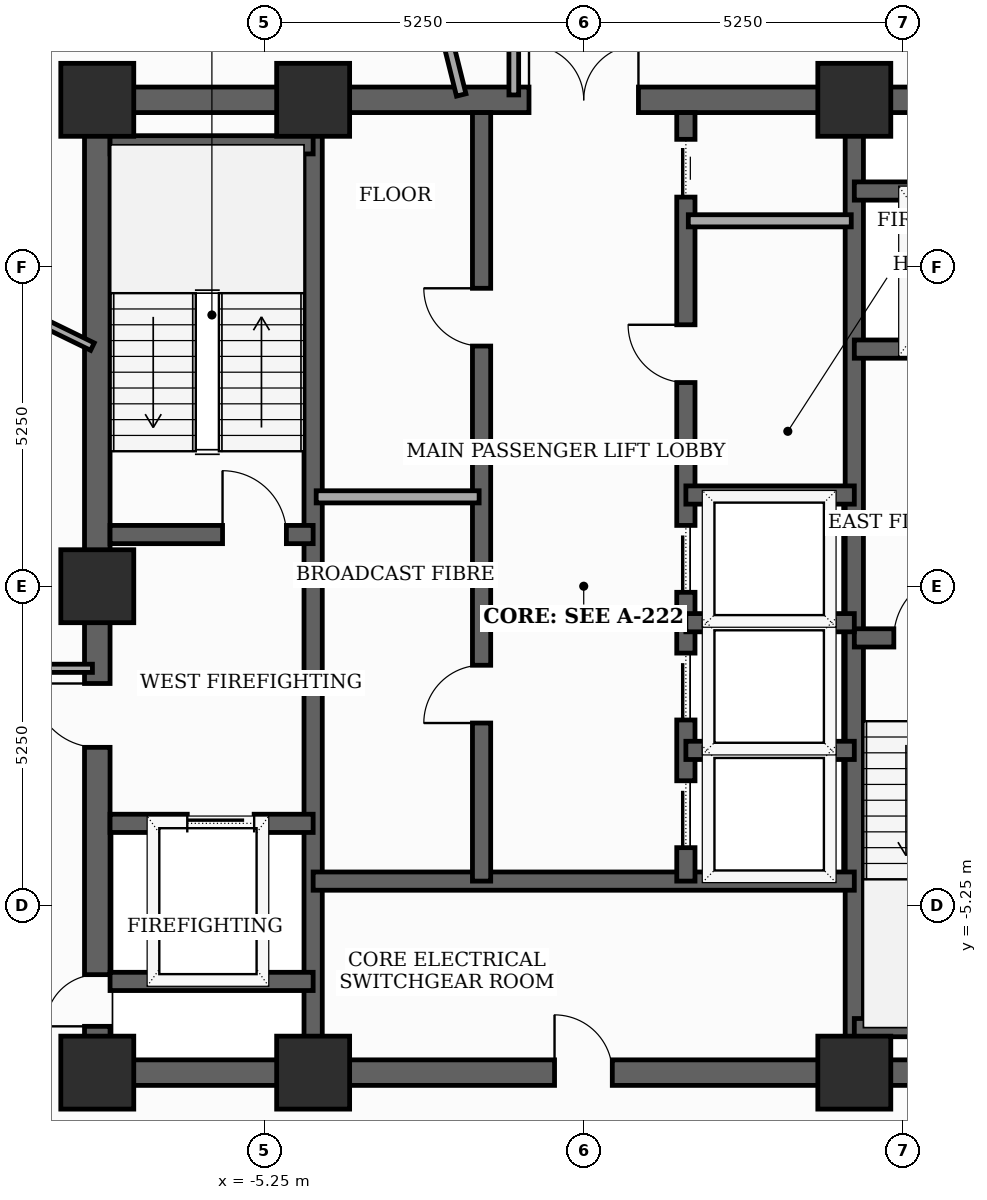
"""IFC4 building model, lengths in metres.
Left out: names, types, materials, properties, quantities, classifications, styles, units other than length and angle.
Written with IfcOpenShell. Run it as: python <this file> out.ifc"""

import sys

from ifc_helpers import new_model, si_unit, direction, frame, frame_2d, origin, origin_2d, place, context, subcontext, project, spatial, rectangle, extrude, element, fill, save


model = new_model("IFC4")
c1 = context("Model", 3, precision=1e-05, world=origin(), true_north=direction((0.0, 1.0)))
c2 = subcontext(c1, "Body", "Model", "MODEL_VIEW")
j1 = project(units=[si_unit("LENGTHUNIT", "METRE"), si_unit("PLANEANGLEUNIT", "RADIAN")], contexts=[c1])
p1 = place(None, origin())
s1 = spatial("IfcSite", under=j1, at=p1, CompositionType="ELEMENT")
p2 = place(p1, origin())
s2 = spatial("IfcBuilding", under=s1, at=p2, CompositionType="ELEMENT")
p3 = place(p2, frame((0.0, 0.0, 218.9)))
s3 = spatial("IfcBuildingStorey", under=s2, at=p3, CompositionType="ELEMENT", Elevation=218.9)
for number, where, z_axis, x_axis in (
    (1, (-8.0, -8.0, 0.0), (0.0, 0.0, 1.0), (1.0, 0.0, 0.0)),
    (2, (-4.45, -8.0, 0.0), (0.0, 0.0, 1.0), (1.0, 0.0, 0.0)),
    (3, (4.45, -8.0, 0.0), (0.0, 0.0, 1.0), (1.0, 0.0, 0.0)),
    (4, (4.45, 8.0, 0.0), (0.0, 0.0, 1.0), (1.0, 0.0, 0.0)),
    (5, (-4.45, 8.0, 0.0), (0.0, 0.0, 1.0), (1.0, 0.0, 0.0)),
    (6, (-8.0, 8.0, 0.0), (0.0, 0.0, 1.0), (1.0, 0.0, 0.0)),
    (7, (-8.0, 0.0, 0.0), (0.0, 0.0, 1.0), (1.0, 0.0, 0.0)),
):
    element("IfcColumn", number, at=place(p3, frame(where, z_axis=z_axis, x_axis=x_axis)), inside=s3, PredefinedType="COLUMN", context=c2, shape_type="SweptSolid", body=[
        extrude(rectangle(XDim=1.2, YDim=1.2, at=origin_2d()), origin(), (0.0, 0.0, 1.0), 3.7),
    ])
p4 = place(p3, frame((-8.0, -8.0, 0.0), z_axis=(0.0, 0.0, 1.0), x_axis=(0.0, 1.0, 0.0)))
e8 = element("IfcWall", 8, at=p4, inside=s3, PredefinedType="SHEAR", context=c2, shape_type="SweptSolid", body=[
    extrude(rectangle(XDim=16.0, YDim=0.42, at=frame_2d((8.0, 0.0))), origin(), (0.0, 0.0, 1.0), 3.5),
])
p5 = place(p4, frame((0.761, 0.0, 0.0)))
e9 = element("IfcOpeningElement", 9, at=p5, cuts=e8, PredefinedType="OPENING", context=c2, shape_type="SweptSolid", body=[
    extrude(rectangle(XDim=0.85, YDim=2.02, at=frame_2d((0.425, 1.01))), frame((0.0, 0.22, 0.0), z_axis=(0.0, -1.0, 0.0), x_axis=(1.0, 0.0, 0.0)), (0.0, 0.0, 1.0), 0.44),
])
p6 = place(p4, frame((5.35, 0.0, 0.0)))
e10 = element("IfcOpeningElement", 10, at=p6, cuts=e8, PredefinedType="OPENING", context=c2, shape_type="SweptSolid", body=[
    extrude(rectangle(XDim=1.05, YDim=2.15, at=frame_2d((0.525, 1.075))), frame((0.0, 0.22, 0.0), z_axis=(0.0, -1.0, 0.0), x_axis=(1.0, 0.0, 0.0)), (0.0, 0.0, 1.0), 0.44),
])
p7 = place(p3, frame((-8.0, -8.0, 0.0), z_axis=(0.0, 0.0, 1.0), x_axis=(1.0, 0.0, 0.0)))
e11 = element("IfcWall", 11, at=p7, inside=s3, PredefinedType="SHEAR", context=c2, shape_type="SweptSolid", body=[
    extrude(rectangle(XDim=16.0, YDim=0.42, at=frame_2d((8.0, 0.0))), origin(), (0.0, 0.0, 1.0), 3.5),
])
p8 = place(p7, frame((7.52, 0.0, 0.0)))
e12 = element("IfcOpeningElement", 12, at=p8, cuts=e11, PredefinedType="OPENING", context=c2, shape_type="SweptSolid", body=[
    extrude(rectangle(XDim=0.95, YDim=2.1, at=frame_2d((0.475, 1.05))), frame((0.0, 0.22, 0.0), z_axis=(0.0, -1.0, 0.0), x_axis=(1.0, 0.0, 0.0)), (0.0, 0.0, 1.0), 0.44),
])
p9 = place(p3, frame((-8.0, 8.0, 0.0), z_axis=(0.0, 0.0, 1.0), x_axis=(1.0, 0.0, 0.0)))
e13 = element("IfcWall", 13, at=p9, inside=s3, PredefinedType="SHEAR", context=c2, shape_type="SweptSolid", body=[
    extrude(rectangle(XDim=16.0, YDim=0.42, at=frame_2d((8.0, 0.0))), origin(), (0.0, 0.0, 1.0), 3.5),
])
p10 = place(p9, frame((7.1, 0.0, 0.0)))
e14 = element("IfcOpeningElement", 14, at=p10, cuts=e13, PredefinedType="OPENING", context=c2, shape_type="SweptSolid", body=[
    extrude(rectangle(XDim=1.8, YDim=2.15, at=frame_2d((0.9, 1.075))), frame((0.0, 0.22, 0.0), z_axis=(0.0, -1.0, 0.0), x_axis=(1.0, 0.0, 0.0)), (0.0, 0.0, 1.0), 0.44),
])
for number, where, z_axis, x_axis in (
    (15, (-4.45, -7.79, 0.0), (0.0, 0.0, 1.0), (0.0, 1.0, 0.0)),
    (16, (4.45, -7.79, 0.0), (0.0, 0.0, 1.0), (0.0, 1.0, 0.0)),
):
    element("IfcWall", number, at=place(p3, frame(where, z_axis=z_axis, x_axis=x_axis)), inside=s3, PredefinedType="SHEAR", context=c2, shape_type="SweptSolid", body=[
        extrude(rectangle(XDim=15.58, YDim=0.3, at=frame_2d((7.79, 0.0))), origin(), (0.0, 0.0, 1.0), 3.5),
    ])
p11 = place(p3, frame((-7.79, 0.85, 0.0), z_axis=(0.0, 0.0, 1.0), x_axis=(1.0, 0.0, 0.0)))
e17 = element("IfcWall", 17, at=p11, inside=s3, PredefinedType="SHEAR", context=c2, shape_type="SweptSolid", body=[
    extrude(rectangle(XDim=3.34, YDim=0.3, at=frame_2d((1.67, 0.0))), origin(), (0.0, 0.0, 1.0), 3.5),
])
p12 = place(p11, frame((1.85, 0.0, 0.0)))
e18 = element("IfcOpeningElement", 18, at=p12, cuts=e17, PredefinedType="OPENING", context=c2, shape_type="SweptSolid", body=[
    extrude(rectangle(XDim=1.05, YDim=2.15, at=frame_2d((0.525, 1.075))), frame((0.0, 0.16, 0.0), z_axis=(0.0, -1.0, 0.0), x_axis=(1.0, 0.0, 0.0)), (0.0, 0.0, 1.0), 0.32),
])
p13 = place(p3, frame((-7.79, 7.26, 0.0), z_axis=(0.0, 0.0, 1.0), x_axis=(1.0, 0.0, 0.0)))
e19 = element("IfcWall", 19, at=p13, inside=s3, PredefinedType="SHEAR", context=c2, shape_type="SweptSolid", body=[
    extrude(rectangle(XDim=3.34, YDim=0.3, at=frame_2d((1.67, 0.0))), origin(), (0.0, 0.0, 1.0), 3.5),
])
p14 = place(p3, frame((4.45, -0.85, 0.0), z_axis=(0.0, 0.0, 1.0), x_axis=(1.0, 0.0, 0.0)))
e20 = element("IfcWall", 20, at=p14, inside=s3, PredefinedType="SHEAR", context=c2, shape_type="SweptSolid", body=[
    extrude(rectangle(XDim=3.34, YDim=0.3, at=frame_2d((1.67, 0.0))), origin(), (0.0, 0.0, 1.0), 3.5),
])
p15 = place(p14, frame((0.65, 0.0, 0.0)))
e21 = element("IfcOpeningElement", 21, at=p15, cuts=e20, PredefinedType="OPENING", context=c2, shape_type="SweptSolid", body=[
    extrude(rectangle(XDim=1.05, YDim=2.15, at=frame_2d((0.525, 1.075))), frame((0.0, 0.16, 0.0), z_axis=(0.0, -1.0, 0.0), x_axis=(1.0, 0.0, 0.0)), (0.0, 0.0, 1.0), 0.32),
])
p16 = place(p3, frame((4.45, -7.26, 0.0), z_axis=(0.0, 0.0, 1.0), x_axis=(1.0, 0.0, 0.0)))
e22 = element("IfcWall", 22, at=p16, inside=s3, PredefinedType="SHEAR", context=c2, shape_type="SweptSolid", body=[
    extrude(rectangle(XDim=3.55, YDim=0.3, at=frame_2d((1.775, 0.0))), origin(), (0.0, 0.0, 1.0), 3.5),
])
p17 = place(p3, frame((-7.79, -3.9, 0.0), z_axis=(0.0, 0.0, 1.0), x_axis=(1.0, 0.0, 0.0)))
e23 = element("IfcWall", 23, at=p17, inside=s3, PredefinedType="SHEAR", context=c2, shape_type="SweptSolid", body=[
    extrude(rectangle(XDim=3.34, YDim=0.3, at=frame_2d((1.67, 0.0))), origin(), (0.0, 0.0, 1.0), 3.5),
])
p18 = place(p17, frame((1.27, 0.0, 0.0)))
e24 = element("IfcOpeningElement", 24, at=p18, cuts=e23, PredefinedType="OPENING", context=c2, shape_type="SweptSolid", body=[
    extrude(rectangle(XDim=1.1, YDim=2.1, at=frame_2d((0.55, 1.05))), frame((0.0, 0.16, 0.0), z_axis=(0.0, -1.0, 0.0), x_axis=(1.0, 0.0, 0.0)), (0.0, 0.0, 1.0), 0.32),
])
p19 = place(p3, frame((-7.79, -6.5, 0.0), z_axis=(0.0, 0.0, 1.0), x_axis=(1.0, 0.0, 0.0)))
e25 = element("IfcWall", 25, at=p19, inside=s3, PredefinedType="SHEAR", context=c2, shape_type="SweptSolid", body=[
    extrude(rectangle(XDim=3.34, YDim=0.3, at=frame_2d((1.67, 0.0))), origin(), (0.0, 0.0, 1.0), 3.5),
])
p20 = place(p3, frame((4.45, 3.9, 0.0), z_axis=(0.0, 0.0, 1.0), x_axis=(1.0, 0.0, 0.0)))
e26 = element("IfcWall", 26, at=p20, inside=s3, PredefinedType="SHEAR", context=c2, shape_type="SweptSolid", body=[
    extrude(rectangle(XDim=3.34, YDim=0.3, at=frame_2d((1.67, 0.0))), origin(), (0.0, 0.0, 1.0), 3.5),
])
p21 = place(p20, frame((1.18, 0.0, 0.0)))
e27 = element("IfcOpeningElement", 27, at=p21, cuts=e26, PredefinedType="OPENING", context=c2, shape_type="SweptSolid", body=[
    extrude(rectangle(XDim=1.1, YDim=2.1, at=frame_2d((0.55, 1.05))), frame((0.0, 0.16, 0.0), z_axis=(0.0, -1.0, 0.0), x_axis=(1.0, 0.0, 0.0)), (0.0, 0.0, 1.0), 0.32),
])
p22 = place(p3, frame((4.45, 6.5, 0.0), z_axis=(0.0, 0.0, 1.0), x_axis=(1.0, 0.0, 0.0)))
e28 = element("IfcWall", 28, at=p22, inside=s3, PredefinedType="SHEAR", context=c2, shape_type="SweptSolid", body=[
    extrude(rectangle(XDim=3.34, YDim=0.3, at=frame_2d((1.67, 0.0))), origin(), (0.0, 0.0, 1.0), 3.5),
])
p23 = place(p3, frame((-4.45, -4.85, 0.0), z_axis=(0.0, 0.0, 1.0), x_axis=(1.0, 0.0, 0.0)))
e29 = element("IfcWall", 29, at=p23, inside=s3, PredefinedType="SHEAR", context=c2, shape_type="SweptSolid", body=[
    extrude(rectangle(XDim=8.9, YDim=0.3, at=frame_2d((4.45, 0.0))), origin(), (0.0, 0.0, 1.0), 3.5),
])
p24 = place(p3, frame((-1.68, -4.85, 0.0), z_axis=(0.0, 0.0, 1.0), x_axis=(0.0, 1.0, 0.0)))
e30 = element("IfcWall", 30, at=p24, inside=s3, PredefinedType="SHEAR", context=c2, shape_type="SweptSolid", body=[
    extrude(rectangle(XDim=12.64, YDim=0.3, at=frame_2d((6.32, 0.0))), origin(), (0.0, 0.0, 1.0), 3.5),
])
p25 = place(p24, frame((2.6, 0.0, 0.0)))
e31 = element("IfcOpeningElement", 31, at=p25, cuts=e30, PredefinedType="OPENING", context=c2, shape_type="SweptSolid", body=[
    extrude(rectangle(XDim=0.95, YDim=2.1, at=frame_2d((0.475, 1.05))), frame((0.0, 0.16, 0.0), z_axis=(0.0, -1.0, 0.0), x_axis=(1.0, 0.0, 0.0)), (0.0, 0.0, 1.0), 0.32),
])
p26 = place(p24, frame((8.8, 0.0, 0.0)))
e32 = element("IfcOpeningElement", 32, at=p26, cuts=e30, PredefinedType="OPENING", context=c2, shape_type="SweptSolid", body=[
    extrude(rectangle(XDim=0.95, YDim=2.1, at=frame_2d((0.475, 1.05))), frame((0.0, 0.16, 0.0), z_axis=(0.0, -1.0, 0.0), x_axis=(1.0, 0.0, 0.0)), (0.0, 0.0, 1.0), 0.32),
])
p27 = place(p3, frame((1.68, -4.85, 0.0), z_axis=(0.0, 0.0, 1.0), x_axis=(0.0, 1.0, 0.0)))
e33 = element("IfcWall", 33, at=p27, inside=s3, PredefinedType="SHEAR", context=c2, shape_type="SweptSolid", body=[
    extrude(rectangle(XDim=12.64, YDim=0.3, at=frame_2d((6.32, 0.0))), origin(), (0.0, 0.0, 1.0), 3.5),
])
p28 = place(p27, frame((0.55, 0.0, 0.0)))
e34 = element("IfcOpeningElement", 34, at=p28, cuts=e33, PredefinedType="OPENING", context=c2, shape_type="SweptSolid", body=[
    extrude(rectangle(XDim=1.1, YDim=2.1, at=frame_2d((0.55, 1.05))), frame((0.0, 0.16, 0.0), z_axis=(0.0, -1.0, 0.0), x_axis=(1.0, 0.0, 0.0)), (0.0, 0.0, 1.0), 0.32),
])
p29 = place(p27, frame((2.65, 0.0, 0.0)))
e35 = element("IfcOpeningElement", 35, at=p29, cuts=e33, PredefinedType="OPENING", context=c2, shape_type="SweptSolid", body=[
    extrude(rectangle(XDim=1.1, YDim=2.1, at=frame_2d((0.55, 1.05))), frame((0.0, 0.16, 0.0), z_axis=(0.0, -1.0, 0.0), x_axis=(1.0, 0.0, 0.0)), (0.0, 0.0, 1.0), 0.32),
])
p30 = place(p27, frame((4.75, 0.0, 0.0)))
e36 = element("IfcOpeningElement", 36, at=p30, cuts=e33, PredefinedType="OPENING", context=c2, shape_type="SweptSolid", body=[
    extrude(rectangle(XDim=1.1, YDim=2.1, at=frame_2d((0.55, 1.05))), frame((0.0, 0.16, 0.0), z_axis=(0.0, -1.0, 0.0), x_axis=(1.0, 0.0, 0.0)), (0.0, 0.0, 1.0), 0.32),
])
p31 = place(p27, frame((8.2, 0.0, 0.0)))
e37 = element("IfcOpeningElement", 37, at=p31, cuts=e33, PredefinedType="OPENING", context=c2, shape_type="SweptSolid", body=[
    extrude(rectangle(XDim=0.95, YDim=2.1, at=frame_2d((0.475, 1.05))), frame((0.0, 0.16, 0.0), z_axis=(0.0, -1.0, 0.0), x_axis=(1.0, 0.0, 0.0)), (0.0, 0.0, 1.0), 0.32),
])
p32 = place(p27, frame((11.25, 0.0, 0.0)))
e38 = element("IfcOpeningElement", 38, at=p32, cuts=e33, PredefinedType="OPENING", context=c2, shape_type="SweptSolid", body=[
    extrude(rectangle(XDim=0.95, YDim=2.1, at=frame_2d((0.475, 1.05))), frame((0.0, 0.16, 0.0), z_axis=(0.0, -1.0, 0.0), x_axis=(1.0, 0.0, 0.0)), (0.0, 0.0, 1.0), 0.32),
])
for number, where, z_axis, x_axis in (
    (39, (1.68, 1.5, 0.0), (0.0, 0.0, 1.0), (1.0, 0.0, 0.0)),
    (40, (1.68, -2.7, 0.0), (0.0, 0.0, 1.0), (1.0, 0.0, 0.0)),
    (41, (1.68, -0.6, 0.0), (0.0, 0.0, 1.0), (1.0, 0.0, 0.0)),
):
    element("IfcWall", number, at=place(p3, frame(where, z_axis=z_axis, x_axis=x_axis)), inside=s3, PredefinedType="SHEAR", context=c2, shape_type="SweptSolid", body=[
        extrude(rectangle(XDim=2.77, YDim=0.3, at=frame_2d((1.385, 0.0))), origin(), (0.0, 0.0, 1.0), 3.5),
    ])
for number, where, z_axis, x_axis in (
    (42, (-4.4, 1.47, 0.0), (0.0, 0.0, 1.0), (1.0, 0.0, 0.0)),
    (43, (1.72, 6.01, 0.0), (0.0, 0.0, 1.0), (1.0, 0.0, 0.0)),
):
    element("IfcWall", number, at=place(p3, frame(where, z_axis=z_axis, x_axis=x_axis)), inside=s3, PredefinedType="SOLIDWALL", context=c2, shape_type="SweptSolid", body=[
        extrude(rectangle(XDim=2.68, YDim=0.2, at=frame_2d((1.34, 0.0))), origin(), (0.0, 0.0, 1.0), 3.5),
    ])
p33 = place(p3, frame((-8.08, -1.35, 0.0), z_axis=(0.0, 0.0, 1.0), x_axis=(-1.0, 0.0, 0.0)))
e44 = element("IfcWall", 44, at=p33, inside=s3, PredefinedType="PARTITIONING", context=c2, shape_type="SweptSolid", body=[
    extrude(rectangle(XDim=2.57, YDim=0.135, at=frame_2d((1.285, 0.0))), origin(), (0.0, 0.0, 1.0), 2.885),
])
p34 = place(p3, frame((-1.15, 10.65, 0.0), z_axis=(0.0, 0.0, 1.0), x_axis=(0.0, -1.0, 0.0)))
e45 = element("IfcWall", 45, at=p34, inside=s3, PredefinedType="PARTITIONING", context=c2, shape_type="SweptSolid", body=[
    extrude(rectangle(XDim=2.57, YDim=0.16, at=frame_2d((1.285, 0.0))), origin(), (0.0, 0.0, 1.0), 2.885),
])
p35 = place(p3, frame((-8.08, 3.941, 0.0), z_axis=(0.0, 0.0, 1.0), x_axis=(-0.898787530524, 0.438384505856, 0.0)))
e46 = element("IfcWall", 46, at=p35, inside=s3, PredefinedType="PARTITIONING", context=c2, shape_type="SweptSolid", body=[
    extrude(rectangle(XDim=16.843, YDim=0.135, at=frame_2d((8.421, 0.0))), origin(), (0.0, 0.0, 1.0), 2.885),
])
p36 = place(p35, frame((7.961, 0.0, 0.0)))
e47 = element("IfcOpeningElement", 47, at=p36, cuts=e46, PredefinedType="OPENING", context=c2, shape_type="SweptSolid", body=[
    extrude(rectangle(XDim=0.92, YDim=2.1, at=frame_2d((0.46, 1.05))), frame((0.0, 0.077, 0.0), z_axis=(0.0, -1.0, 0.0), x_axis=(1.0, 0.0, 0.0)), (0.0, 0.0, 1.0), 0.155),
])
p37 = place(p3, frame((-3.803, 15.255, 0.0), z_axis=(0.0, 0.0, 1.0), x_axis=(0.241851911951, -0.970313172479, 0.0)))
e48 = element("IfcWall", 48, at=p37, inside=s3, PredefinedType="PARTITIONING", context=c2, shape_type="SweptSolid", body=[
    extrude(rectangle(XDim=7.394, YDim=0.16, at=frame_2d((3.697, 0.0))), origin(), (0.0, 0.0, 1.0), 2.885),
])
p38 = place(p5, origin())
e49 = element("IfcDoor", 49, at=p38, inside=s3, OperationType="SINGLE_SWING_LEFT", PredefinedType="TRAPDOOR", context=c2, shape_type="SweptSolid", body=[
    extrude(rectangle(XDim=0.85, YDim=2.02, at=frame_2d((0.425, 1.01))), frame((0.0, 0.025, 0.0), z_axis=(0.0, -1.0, 0.0), x_axis=(1.0, 0.0, 0.0)), (0.0, 0.0, 1.0), 0.05),
])
fill(e9, e49)
p39 = place(p6, origin())
e50 = element("IfcDoor", 50, at=p39, inside=s3, OperationType="SINGLE_SWING_RIGHT", PredefinedType="DOOR", context=c2, shape_type="SweptSolid", body=[
    extrude(rectangle(XDim=1.05, YDim=2.15, at=frame_2d((0.525, 1.075))), frame((0.0, 0.025, 0.0), z_axis=(0.0, -1.0, 0.0), x_axis=(1.0, 0.0, 0.0)), (0.0, 0.0, 1.0), 0.05),
])
fill(e10, e50)
p40 = place(p8, origin())
e51 = element("IfcDoor", 51, at=p40, inside=s3, OperationType="SINGLE_SWING_LEFT", PredefinedType="DOOR", context=c2, shape_type="SweptSolid", body=[
    extrude(rectangle(XDim=0.95, YDim=2.1, at=frame_2d((0.475, 1.05))), frame((0.0, 0.025, 0.0), z_axis=(0.0, -1.0, 0.0), x_axis=(1.0, 0.0, 0.0)), (0.0, 0.0, 1.0), 0.05),
])
fill(e12, e51)
p41 = place(p10, origin())
e52 = element("IfcDoor", 52, at=p41, inside=s3, OperationType="DOUBLE_DOOR_SINGLE_SWING", PredefinedType="DOOR", context=c2, shape_type="SweptSolid", body=[
    extrude(rectangle(XDim=1.8, YDim=2.15, at=frame_2d((0.9, 1.075))), frame((0.0, 0.025, 0.0), z_axis=(0.0, -1.0, 0.0), x_axis=(1.0, 0.0, 0.0)), (0.0, 0.0, 1.0), 0.05),
])
fill(e14, e52)
p42 = place(p12, origin())
e53 = element("IfcDoor", 53, at=p42, inside=s3, OperationType="SINGLE_SWING_LEFT", PredefinedType="DOOR", context=c2, shape_type="SweptSolid", body=[
    extrude(rectangle(XDim=1.05, YDim=2.15, at=frame_2d((0.525, 1.075))), frame((0.0, 0.025, 0.0), z_axis=(0.0, -1.0, 0.0), x_axis=(1.0, 0.0, 0.0)), (0.0, 0.0, 1.0), 0.05),
])
fill(e18, e53)
p43 = place(p15, origin())
e54 = element("IfcDoor", 54, at=p43, inside=s3, OperationType="SINGLE_SWING_RIGHT", PredefinedType="DOOR", context=c2, shape_type="SweptSolid", body=[
    extrude(rectangle(XDim=1.05, YDim=2.15, at=frame_2d((0.525, 1.075))), frame((0.0, 0.025, 0.0), z_axis=(0.0, -1.0, 0.0), x_axis=(1.0, 0.0, 0.0)), (0.0, 0.0, 1.0), 0.05),
])
fill(e21, e54)
p44 = place(p18, origin())
e55 = element("IfcDoor", 55, at=p44, inside=s3, OperationType="SLIDING_TO_LEFT", PredefinedType="DOOR", context=c2, shape_type="SweptSolid", body=[
    extrude(rectangle(XDim=1.1, YDim=2.1, at=frame_2d((0.55, 1.05))), frame((0.0, 0.025, 0.0), z_axis=(0.0, -1.0, 0.0), x_axis=(1.0, 0.0, 0.0)), (0.0, 0.0, 1.0), 0.05),
])
fill(e24, e55)
p45 = place(p25, origin())
e56 = element("IfcDoor", 56, at=p45, inside=s3, OperationType="SINGLE_SWING_LEFT", PredefinedType="DOOR", context=c2, shape_type="SweptSolid", body=[
    extrude(rectangle(XDim=0.95, YDim=2.1, at=frame_2d((0.475, 1.05))), frame((0.0, 0.025, 0.0), z_axis=(0.0, -1.0, 0.0), x_axis=(1.0, 0.0, 0.0)), (0.0, 0.0, 1.0), 0.05),
])
fill(e31, e56)
p46 = place(p26, origin())
e57 = element("IfcDoor", 57, at=p46, inside=s3, OperationType="SINGLE_SWING_RIGHT", PredefinedType="DOOR", context=c2, shape_type="SweptSolid", body=[
    extrude(rectangle(XDim=0.95, YDim=2.1, at=frame_2d((0.475, 1.05))), frame((0.0, 0.025, 0.0), z_axis=(0.0, -1.0, 0.0), x_axis=(1.0, 0.0, 0.0)), (0.0, 0.0, 1.0), 0.05),
])
fill(e32, e57)
p47 = place(p28, origin())
e58 = element("IfcDoor", 58, at=p47, inside=s3, OperationType="SLIDING_TO_LEFT", PredefinedType="DOOR", context=c2, shape_type="SweptSolid", body=[
    extrude(rectangle(XDim=1.1, YDim=2.1, at=frame_2d((0.55, 1.05))), frame((0.0, 0.025, 0.0), z_axis=(0.0, -1.0, 0.0), x_axis=(1.0, 0.0, 0.0)), (0.0, 0.0, 1.0), 0.05),
])
fill(e34, e58)
p48 = place(p29, origin())
e59 = element("IfcDoor", 59, at=p48, inside=s3, OperationType="SLIDING_TO_LEFT", PredefinedType="DOOR", context=c2, shape_type="SweptSolid", body=[
    extrude(rectangle(XDim=1.1, YDim=2.1, at=frame_2d((0.55, 1.05))), frame((0.0, 0.025, 0.0), z_axis=(0.0, -1.0, 0.0), x_axis=(1.0, 0.0, 0.0)), (0.0, 0.0, 1.0), 0.05),
])
fill(e35, e59)
p49 = place(p30, origin())
e60 = element("IfcDoor", 60, at=p49, inside=s3, OperationType="SLIDING_TO_LEFT", PredefinedType="DOOR", context=c2, shape_type="SweptSolid", body=[
    extrude(rectangle(XDim=1.1, YDim=2.1, at=frame_2d((0.55, 1.05))), frame((0.0, 0.025, 0.0), z_axis=(0.0, -1.0, 0.0), x_axis=(1.0, 0.0, 0.0)), (0.0, 0.0, 1.0), 0.05),
])
fill(e36, e60)
p50 = place(p31, origin())
e61 = element("IfcDoor", 61, at=p50, inside=s3, OperationType="SINGLE_SWING_RIGHT", PredefinedType="DOOR", context=c2, shape_type="SweptSolid", body=[
    extrude(rectangle(XDim=0.95, YDim=2.1, at=frame_2d((0.475, 1.05))), frame((0.0, 0.025, 0.0), z_axis=(0.0, -1.0, 0.0), x_axis=(1.0, 0.0, 0.0)), (0.0, 0.0, 1.0), 0.05),
])
fill(e37, e61)
p51 = place(p32, origin())
e62 = element("IfcDoor", 62, at=p51, inside=s3, OperationType="SLIDING_TO_LEFT", PredefinedType="DOOR", context=c2, shape_type="SweptSolid", body=[
    extrude(rectangle(XDim=0.95, YDim=2.1, at=frame_2d((0.475, 1.05))), frame((0.0, 0.025, 0.0), z_axis=(0.0, -1.0, 0.0), x_axis=(1.0, 0.0, 0.0)), (0.0, 0.0, 1.0), 0.05),
])
fill(e38, e62)
save(model, sys.argv[1])
